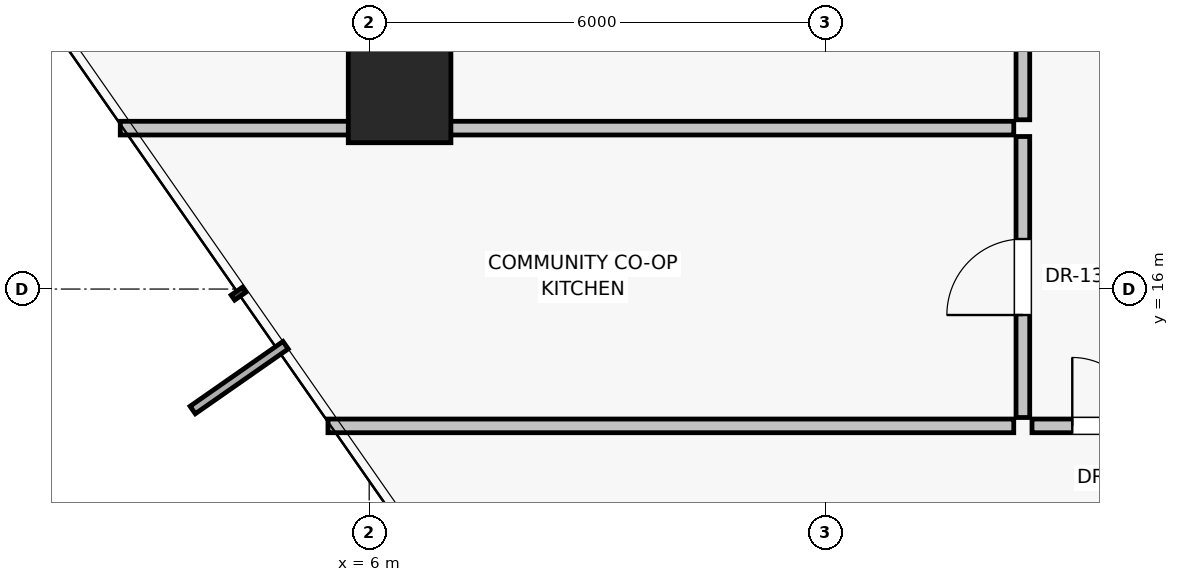
"""IFC4 building model, lengths in metres.
Left out: names, types, materials, properties, quantities, classifications, styles, units other than length and angle.
Written with IfcOpenShell. Run it as: python <this file> out.ifc"""

import sys

from ifc_helpers import new_model, si_unit, direction, frame, frame_2d, origin, origin_2d, place, context, subcontext, project, spatial, rectangle, extrude, source, transform, mapped, element, fill, save


model = new_model("IFC4")
c1 = context("Model", 3, precision=1e-05, world=origin(), true_north=direction((0.0, 1.0)))
c2 = subcontext(c1, "Body", "Model", "MODEL_VIEW")
j1 = project(units=[si_unit("LENGTHUNIT", "METRE"), si_unit("PLANEANGLEUNIT", "RADIAN")], contexts=[c1])
p1 = place(None, origin())
s1 = spatial("IfcSite", under=j1, at=p1, CompositionType="ELEMENT")
p2 = place(p1, origin())
s2 = spatial("IfcBuilding", under=s1, at=p2, CompositionType="ELEMENT")
p3 = place(p2, frame((0.0, 0.0, 40.3)))
s3 = spatial("IfcBuildingStorey", under=s2, at=p3, CompositionType="ELEMENT", Elevation=40.3)
p4 = place(p3, frame((6.4, 18.6, 0.0), z_axis=(0.0, 0.0, 1.0), x_axis=(1.0, 0.0, 0.0)))
e1 = element("IfcColumn", 1, at=p4, inside=s3, PredefinedType="COLUMN", context=c2, shape_type="SweptSolid", body=[
    extrude(rectangle(XDim=1.35, YDim=1.35, at=origin_2d()), origin(), (0.0, 0.0, 1.0), 3.25),
])
p5 = place(p3, frame((14.48, 14.2, 0.0), z_axis=(0.0, 0.0, 1.0), x_axis=(-1.0, 0.0, 0.0)))
e2 = element("IfcWall", 2, at=p5, inside=s3, PredefinedType="PARTITIONING", context=c2, shape_type="SweptSolid", body=[
    extrude(rectangle(XDim=9.022, YDim=0.18, at=frame_2d((4.511, 0.0))), origin(), (0.0, 0.0, 1.0), 3.0),
])
p6 = place(p3, frame((14.6, 14.31, 0.0), z_axis=(0.0, 0.0, 1.0), x_axis=(0.0, 1.0, 0.0)))
e3 = element("IfcWall", 3, at=p6, inside=s3, PredefinedType="PARTITIONING", context=c2, shape_type="SweptSolid", body=[
    extrude(rectangle(XDim=3.697, YDim=0.18, at=frame_2d((1.849, 0.0))), origin(), (0.0, 0.0, 1.0), 3.0),
])
p7 = place(p6, frame((1.348, 0.0, 0.0)))
e4 = element("IfcOpeningElement", 4, at=p7, cuts=e3, PredefinedType="OPENING", context=c2, shape_type="SweptSolid", body=[
    extrude(rectangle(XDim=1.0, YDim=2.01, at=frame_2d((0.5, 1.005))), frame((0.0, 0.1, 0.0), z_axis=(0.0, -1.0, 0.0), x_axis=(1.0, 0.0, 0.0)), (0.0, 0.0, 1.0), 0.2),
])
p8 = place(p3, frame((14.6, 18.227, 0.0), z_axis=(0.0, 0.0, 1.0), x_axis=(0.0, 1.0, 0.0)))
e5 = element("IfcWall", 5, at=p8, inside=s3, PredefinedType="PARTITIONING", context=c2, shape_type="SweptSolid", body=[
    extrude(rectangle(XDim=6.171, YDim=0.18, at=frame_2d((3.085, 0.0))), origin(), (0.0, 0.0, 1.0), 3.0),
])
p9 = place(p8, frame((2.585, 0.0, 0.0)))
e6 = element("IfcOpeningElement", 6, at=p9, cuts=e5, PredefinedType="OPENING", context=c2, shape_type="SweptSolid", body=[
    extrude(rectangle(XDim=1.0, YDim=2.01, at=frame_2d((0.5, 1.005))), frame((0.0, 0.1, 0.0), z_axis=(0.0, -1.0, 0.0), x_axis=(1.0, 0.0, 0.0)), (0.0, 0.0, 1.0), 0.2),
])
p10 = place(p3, frame((14.48, 18.117, 0.0), z_axis=(0.0, 0.0, 1.0), x_axis=(-1.0, 0.0, 0.0)))
e7 = element("IfcWall", 7, at=p10, inside=s3, PredefinedType="PARTITIONING", context=c2, shape_type="SweptSolid", body=[
    extrude(rectangle(XDim=11.755, YDim=0.18, at=frame_2d((5.877, 0.0))), origin(), (0.0, 0.0, 1.0), 2.299),
])
p11 = place(p3, frame((14.72, 14.2, 0.0), z_axis=(0.0, 0.0, 1.0), x_axis=(1.0, 0.0, 0.0)))
e8 = element("IfcWall", 8, at=p11, inside=s3, PredefinedType="PARTITIONING", context=c2, shape_type="SweptSolid", body=[
    extrude(rectangle(XDim=1.96, YDim=0.18, at=frame_2d((0.98, 0.0))), origin(), (0.0, 0.0, 1.0), 3.0),
])
p12 = place(p11, frame((0.53, 0.0, 0.0)))
e9 = element("IfcOpeningElement", 9, at=p12, cuts=e8, PredefinedType="OPENING", context=c2, shape_type="SweptSolid", body=[
    extrude(rectangle(XDim=0.9, YDim=2.01, at=frame_2d((0.45, 1.005))), frame((0.0, 0.1, 0.0), z_axis=(0.0, -1.0, 0.0), x_axis=(1.0, 0.0, 0.0)), (0.0, 0.0, 1.0), 0.2),
])
m1 = source(origin(), c2, "Body", "SweptSolid", [
    extrude(rectangle(XDim=1.0, YDim=2.01, at=frame_2d((0.5, 1.005))), frame((0.0, 0.025, 0.0), z_axis=(0.0, -1.0, 0.0), x_axis=(1.0, 0.0, 0.0)), (0.0, 0.0, 1.0), 0.05),
])
p13 = place(p7, origin())
e10 = element("IfcDoor", 10, at=p13, inside=s3, OperationType="SINGLE_SWING_LEFT", PredefinedType="DOOR", context=c2, shape_type="MappedRepresentation", body=[
    mapped(m1, transform((0.0, 0.0, 0.0), scale=1.0)),
])
fill(e4, e10)
m2 = source(origin(), c2, "Body", "SweptSolid", [
    extrude(rectangle(XDim=0.9, YDim=2.01, at=frame_2d((0.45, 1.005))), frame((0.0, 0.025, 0.0), z_axis=(0.0, -1.0, 0.0), x_axis=(1.0, 0.0, 0.0)), (0.0, 0.0, 1.0), 0.05),
])
p14 = place(p12, origin())
e11 = element("IfcDoor", 11, at=p14, inside=s3, OperationType="SINGLE_SWING_LEFT", PredefinedType="DOOR", context=c2, shape_type="MappedRepresentation", body=[
    mapped(m2, transform((0.0, 0.0, 0.0), scale=1.0)),
])
fill(e9, e11)
save(model, sys.argv[1])
